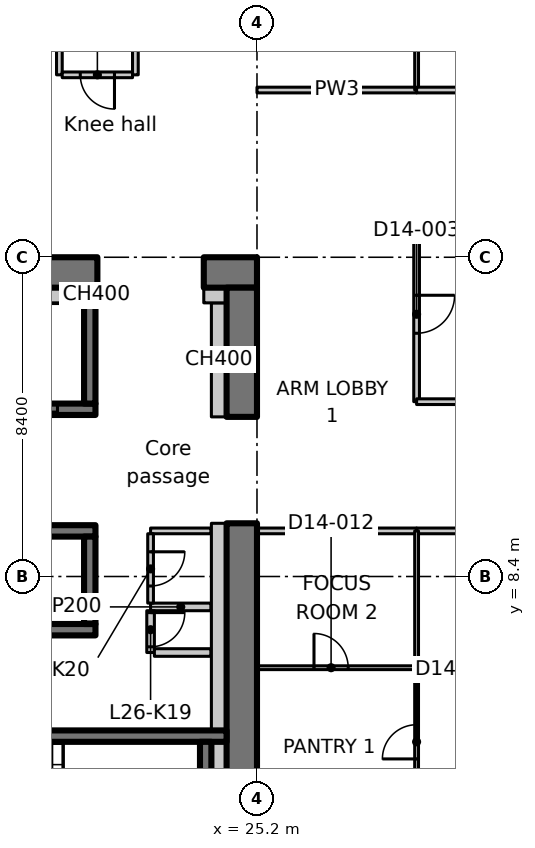
"""IFC4 building model, lengths in metres.
Left out: names, types, materials, properties, quantities, classifications, styles, units other than length and angle.
Written with IfcOpenShell. Run it as: python <this file> out.ifc"""

import sys

from ifc_helpers import new_model, si_unit, direction, frame, frame_2d, origin, place, context, subcontext, project, spatial, polyline, rectangle, outline, extrude, element, fill, save


model = new_model("IFC4")
c1 = context("Model", 3, precision=1e-05, world=origin(), true_north=direction((0.0, 1.0)))
c2 = subcontext(c1, "Body", "Model", "MODEL_VIEW")
j1 = project(units=[si_unit("LENGTHUNIT", "METRE"), si_unit("PLANEANGLEUNIT", "RADIAN")], contexts=[c1])
p1 = place(None, origin())
s1 = spatial("IfcSite", under=j1, at=p1, CompositionType="ELEMENT")
p2 = place(p1, origin())
s2 = spatial("IfcBuilding", under=s1, at=p2, CompositionType="ELEMENT")
p3 = place(p2, frame((0.0, 0.0, 109.7)))
s3 = spatial("IfcBuildingStorey", under=s2, at=p3, CompositionType="ELEMENT", Elevation=109.7)
p4 = place(p3, frame((-1.1, 16.4, 0.0), z_axis=(0.0, 0.0, 1.0), x_axis=(1.0, 0.0, 0.0)))
e1 = element("IfcWall", 1, at=p4, inside=s3, PredefinedType="SHEAR", context=c2, shape_type="SweptSolid", body=[
    extrude(rectangle(XDim=22.1, YDim=0.8, at=frame_2d((11.05, 0.0))), origin(), (0.0, 0.0, 1.0), 3.35),
])
p5 = place(p4, frame((3.15, 0.0, 0.0)))
e2 = element("IfcOpeningElement", 2, at=p5, cuts=e1, PredefinedType="OPENING", context=c2, shape_type="SweptSolid", body=[
    extrude(rectangle(XDim=1.1, YDim=2.3, at=frame_2d((0.55, 1.15))), frame((0.0, 0.41, 0.0), z_axis=(0.0, -1.0, 0.0), x_axis=(1.0, 0.0, 0.0)), (0.0, 0.0, 1.0), 0.82),
])
p6 = place(p3, frame((23.8, 16.4, 0.0), z_axis=(0.0, 0.0, 1.0), x_axis=(1.0, 0.0, 0.0)))
e3 = element("IfcWall", 3, at=p6, inside=s3, PredefinedType="SHEAR", context=c2, shape_type="SweptSolid", body=[
    extrude(rectangle(XDim=1.4, YDim=0.8, at=frame_2d((0.7, 0.0))), origin(), (0.0, 0.0, 1.0), 3.35),
])
p7 = place(p3, frame((24.8, 0.8, 0.0), z_axis=(0.0, 0.0, 1.0), x_axis=(0.0, 1.0, 0.0)))
e4 = element("IfcWall", 4, at=p7, inside=s3, PredefinedType="SHEAR", context=c2, shape_type="SweptSolid", body=[
    extrude(rectangle(XDim=9.0, YDim=0.8, at=frame_2d((4.5, 0.0))), origin(), (0.0, 0.0, 1.0), 3.35),
])
p8 = place(p3, frame((24.8, 12.6, 0.0), z_axis=(0.0, 0.0, 1.0), x_axis=(0.0, 1.0, 0.0)))
e5 = element("IfcWall", 5, at=p8, inside=s3, PredefinedType="SHEAR", context=c2, shape_type="SweptSolid", body=[
    extrude(rectangle(XDim=3.4, YDim=0.8, at=frame_2d((1.7, 0.0))), origin(), (0.0, 0.0, 1.0), 3.35),
])
p9 = place(p3, frame((24.2, 12.6, 0.0), z_axis=(0.0, 0.0, 1.0), x_axis=(0.0, 1.0, 0.0)))
e6 = element("IfcWall", 6, at=p9, inside=s3, PredefinedType="PARTITIONING", context=c2, shape_type="SweptSolid", body=[
    extrude(rectangle(XDim=3.0, YDim=0.4, at=frame_2d((1.5, 0.0))), origin(), (0.0, 0.0, 1.0), 3.35),
])
p10 = place(p3, frame((23.8, 15.8, 0.0), z_axis=(0.0, 0.0, 1.0), x_axis=(1.0, 0.0, 0.0)))
e7 = element("IfcWall", 7, at=p10, inside=s3, PredefinedType="PARTITIONING", context=c2, shape_type="SweptSolid", body=[
    extrude(rectangle(XDim=0.6, YDim=0.4, at=frame_2d((0.3, 0.0))), origin(), (0.0, 0.0, 1.0), 3.35),
])
p11 = place(p3, frame((0.8, 7.0, 0.0), z_axis=(0.0, 0.0, 1.0), x_axis=(1.0, 0.0, 0.0)))
e8 = element("IfcWall", 8, at=p11, inside=s3, PredefinedType="SHEAR", context=c2, shape_type="SweptSolid", body=[
    extrude(rectangle(XDim=20.15, YDim=0.3, at=frame_2d((10.075, 0.0))), origin(), (0.0, 0.0, 1.0), 3.35),
])
p12 = place(p3, frame((0.8, 9.6, 0.0), z_axis=(0.0, 0.0, 1.0), x_axis=(1.0, 0.0, 0.0)))
e9 = element("IfcWall", 9, at=p12, inside=s3, PredefinedType="SHEAR", context=c2, shape_type="SweptSolid", body=[
    extrude(rectangle(XDim=20.15, YDim=0.3, at=frame_2d((10.075, 0.0))), origin(), (0.0, 0.0, 1.0), 3.35),
])
p13 = place(p12, frame((1.25, 0.0, 0.0)))
e10 = element("IfcOpeningElement", 10, at=p13, cuts=e9, PredefinedType="OPENING", context=c2, shape_type="SweptSolid", body=[
    extrude(rectangle(XDim=1.1, YDim=2.3, at=frame_2d((0.55, 1.15))), frame((0.0, 0.16, 0.0), z_axis=(0.0, -1.0, 0.0), x_axis=(1.0, 0.0, 0.0)), (0.0, 0.0, 1.0), 0.32),
])
p14 = place(p12, frame((4.05, 0.0, 0.0)))
e11 = element("IfcOpeningElement", 11, at=p14, cuts=e9, PredefinedType="OPENING", context=c2, shape_type="SweptSolid", body=[
    extrude(rectangle(XDim=1.1, YDim=2.3, at=frame_2d((0.55, 1.15))), frame((0.0, 0.16, 0.0), z_axis=(0.0, -1.0, 0.0), x_axis=(1.0, 0.0, 0.0)), (0.0, 0.0, 1.0), 0.32),
])
p15 = place(p12, frame((6.85, 0.0, 0.0)))
e12 = element("IfcOpeningElement", 12, at=p15, cuts=e9, PredefinedType="OPENING", context=c2, shape_type="SweptSolid", body=[
    extrude(rectangle(XDim=1.1, YDim=2.3, at=frame_2d((0.55, 1.15))), frame((0.0, 0.16, 0.0), z_axis=(0.0, -1.0, 0.0), x_axis=(1.0, 0.0, 0.0)), (0.0, 0.0, 1.0), 0.32),
])
p16 = place(p12, frame((9.65, 0.0, 0.0)))
e13 = element("IfcOpeningElement", 13, at=p16, cuts=e9, PredefinedType="OPENING", context=c2, shape_type="SweptSolid", body=[
    extrude(rectangle(XDim=1.1, YDim=2.3, at=frame_2d((0.55, 1.15))), frame((0.0, 0.16, 0.0), z_axis=(0.0, -1.0, 0.0), x_axis=(1.0, 0.0, 0.0)), (0.0, 0.0, 1.0), 0.32),
])
p17 = place(p12, frame((12.45, 0.0, 0.0)))
e14 = element("IfcOpeningElement", 14, at=p17, cuts=e9, PredefinedType="OPENING", context=c2, shape_type="SweptSolid", body=[
    extrude(rectangle(XDim=1.1, YDim=2.3, at=frame_2d((0.55, 1.15))), frame((0.0, 0.16, 0.0), z_axis=(0.0, -1.0, 0.0), x_axis=(1.0, 0.0, 0.0)), (0.0, 0.0, 1.0), 0.32),
])
p18 = place(p12, frame((15.25, 0.0, 0.0)))
e15 = element("IfcOpeningElement", 15, at=p18, cuts=e9, PredefinedType="OPENING", context=c2, shape_type="SweptSolid", body=[
    extrude(rectangle(XDim=1.1, YDim=2.3, at=frame_2d((0.55, 1.15))), frame((0.0, 0.16, 0.0), z_axis=(0.0, -1.0, 0.0), x_axis=(1.0, 0.0, 0.0)), (0.0, 0.0, 1.0), 0.32),
])
p19 = place(p3, frame((20.8, 7.15, 0.0), z_axis=(0.0, 0.0, 1.0), x_axis=(0.0, 1.0, 0.0)))
e16 = element("IfcWall", 16, at=p19, inside=s3, PredefinedType="SHEAR", context=c2, shape_type="SweptSolid", body=[
    extrude(rectangle(XDim=2.3, YDim=0.3, at=frame_2d((1.15, 0.0))), origin(), (0.0, 0.0, 1.0), 3.35),
])
p20 = place(p3, frame((15.05, 12.8, 0.0), z_axis=(0.0, 0.0, 1.0), x_axis=(1.0, 0.0, 0.0)))
e17 = element("IfcWall", 17, at=p20, inside=s3, PredefinedType="SHEAR", context=c2, shape_type="SweptSolid", body=[
    extrude(rectangle(XDim=5.9, YDim=0.3, at=frame_2d((2.95, 0.0))), origin(), (0.0, 0.0, 1.0), 3.35),
])
p21 = place(p20, frame((3.8, 0.0, 0.0)))
e18 = element("IfcOpeningElement", 18, at=p21, cuts=e17, PredefinedType="OPENING", context=c2, shape_type="SweptSolid", body=[
    extrude(rectangle(XDim=1.1, YDim=2.3, at=frame_2d((0.55, 1.15))), frame((0.0, 0.16, 0.0), z_axis=(0.0, -1.0, 0.0), x_axis=(1.0, 0.0, 0.0)), (0.0, 0.0, 1.0), 0.32),
])
p22 = place(p3, frame((20.8, 12.95, 0.0), z_axis=(0.0, 0.0, 1.0), x_axis=(0.0, 1.0, 0.0)))
e19 = element("IfcWall", 19, at=p22, inside=s3, PredefinedType="SHEAR", context=c2, shape_type="SweptSolid", body=[
    extrude(rectangle(XDim=3.05, YDim=0.3, at=frame_2d((1.525, 0.0))), origin(), (0.0, 0.0, 1.0), 3.35),
])
p23 = place(p3, frame((15.8, 4.2, 0.0), z_axis=(0.0, 0.0, 1.0), x_axis=(1.0, 0.0, 0.0)))
e20 = element("IfcWall", 20, at=p23, inside=s3, PredefinedType="SHEAR", context=c2, shape_type="SweptSolid", body=[
    extrude(rectangle(XDim=8.6, YDim=0.3, at=frame_2d((4.3, 0.0))), origin(), (0.0, 0.0, 1.0), 3.35),
])
p24 = place(p23, frame((0.4, 0.0, 0.0)))
e21 = element("IfcOpeningElement", 21, at=p24, cuts=e20, PredefinedType="OPENING", context=c2, shape_type="SweptSolid", body=[
    extrude(rectangle(XDim=1.0, YDim=2.1, at=frame_2d((0.5, 1.05))), frame((0.0, 0.16, 0.0), z_axis=(0.0, -1.0, 0.0), x_axis=(1.0, 0.0, 0.0)), (0.0, 0.0, 1.0), 0.32),
])
p25 = place(p3, frame((23.85, 1.5, 0.0), z_axis=(0.0, 0.0, 1.0), x_axis=(0.0, 1.0, 0.0)))
e22 = element("IfcWall", 22, at=p25, inside=s3, PredefinedType="SHEAR", context=c2, shape_type="SweptSolid", body=[
    extrude(rectangle(XDim=2.55, YDim=0.3, at=frame_2d((1.275, 0.0))), origin(), (0.0, 0.0, 1.0), 3.35),
])
p26 = place(p3, frame((23.988, 7.6, 0.0), z_axis=(0.0, 0.0, 1.0), x_axis=(-1.0, 0.0, 0.0)))
e23 = element("IfcWall", 23, at=p26, inside=s3, PredefinedType="PARTITIONING", context=c2, shape_type="SweptSolid", body=[
    extrude(rectangle(XDim=1.588, YDim=0.2, at=frame_2d((0.794, 0.0))), origin(), (0.0, 0.0, 1.0), 3.35),
])
p27 = place(p3, frame((22.4, 7.5, 0.0), z_axis=(0.0, 0.0, 1.0), x_axis=(0.0, -1.0, 0.0)))
e24 = element("IfcWall", 24, at=p27, inside=s3, PredefinedType="PARTITIONING", context=c2, shape_type="SweptSolid", body=[
    extrude(rectangle(XDim=1.1, YDim=0.2, at=frame_2d((0.55, 0.0))), origin(), (0.0, 0.0, 1.0), 3.35),
])
p28 = place(p27, frame((0.05, 0.0, 0.0)))
e25 = element("IfcOpeningElement", 25, at=p28, cuts=e24, PredefinedType="OPENING", context=c2, shape_type="SweptSolid", body=[
    extrude(rectangle(XDim=0.9, YDim=2.1, at=frame_2d((0.45, 1.05))), frame((0.0, 0.11, 0.0), z_axis=(0.0, -1.0, 0.0), x_axis=(1.0, 0.0, 0.0)), (0.0, 0.0, 1.0), 0.22),
])
p29 = place(p3, frame((22.5, 6.4, 0.0), z_axis=(0.0, 0.0, 1.0), x_axis=(1.0, 0.0, 0.0)))
e26 = element("IfcWall", 26, at=p29, inside=s3, PredefinedType="PARTITIONING", context=c2, shape_type="SweptSolid", body=[
    extrude(rectangle(XDim=1.488, YDim=0.2, at=frame_2d((0.744, 0.0))), origin(), (0.0, 0.0, 1.0), 3.35),
])
p30 = place(p3, frame((23.988, 9.6, 0.0), z_axis=(0.0, 0.0, 1.0), x_axis=(-1.0, 0.0, 0.0)))
e27 = element("IfcWall", 27, at=p30, inside=s3, PredefinedType="PARTITIONING", context=c2, shape_type="SweptSolid", body=[
    extrude(rectangle(XDim=1.588, YDim=0.15, at=frame_2d((0.794, 0.0))), origin(), (0.0, 0.0, 1.0), 3.35),
])
p31 = place(p3, frame((22.4, 9.525, 0.0), z_axis=(0.0, 0.0, 1.0), x_axis=(0.0, -1.0, 0.0)))
e28 = element("IfcWall", 28, at=p31, inside=s3, PredefinedType="PARTITIONING", context=c2, shape_type="SweptSolid", body=[
    extrude(rectangle(XDim=1.825, YDim=0.15, at=frame_2d((0.913, 0.0))), origin(), (0.0, 0.0, 1.0), 3.35),
])
p32 = place(p31, frame((0.475, 0.0, 0.0)))
e29 = element("IfcOpeningElement", 29, at=p32, cuts=e28, PredefinedType="OPENING", context=c2, shape_type="SweptSolid", body=[
    extrude(rectangle(XDim=0.9, YDim=2.1, at=frame_2d((0.45, 1.05))), frame((0.0, 0.085, 0.0), z_axis=(0.0, -1.0, 0.0), x_axis=(1.0, 0.0, 0.0)), (0.0, 0.0, 1.0), 0.17),
])
p33 = place(p3, frame((20.0, 21.6, 0.0), z_axis=(0.0, 0.0, 1.0), x_axis=(0.0, 1.0, 0.0)))
e30 = element("IfcWall", 30, at=p33, inside=s3, PredefinedType="PARTITIONING", context=c2, shape_type="SweptSolid", body=[
    extrude(rectangle(XDim=2.4, YDim=0.15, at=frame_2d((1.2, 0.0))), origin(), (0.0, 0.0, 1.0), 3.35),
])
p34 = place(p3, frame((22.0, 23.925, 0.0), z_axis=(0.0, 0.0, 1.0), x_axis=(0.0, -1.0, 0.0)))
e31 = element("IfcWall", 31, at=p34, inside=s3, PredefinedType="PARTITIONING", context=c2, shape_type="SweptSolid", body=[
    extrude(rectangle(XDim=2.325, YDim=0.15, at=frame_2d((1.163, 0.0))), origin(), (0.0, 0.0, 1.0), 3.35),
])
p35 = place(p3, frame((21.925, 21.6, 0.0), z_axis=(0.0, 0.0, 1.0), x_axis=(-1.0, 0.0, 0.0)))
e32 = element("IfcWall", 32, at=p35, inside=s3, PredefinedType="PARTITIONING", context=c2, shape_type="SweptSolid", body=[
    extrude(rectangle(XDim=1.85, YDim=0.15, at=frame_2d((0.925, 0.0))), origin(), (0.0, 0.0, 1.0), 3.35),
])
p36 = place(p35, frame((0.475, 0.0, 0.0)))
e33 = element("IfcOpeningElement", 33, at=p36, cuts=e32, PredefinedType="OPENING", context=c2, shape_type="SweptSolid", body=[
    extrude(rectangle(XDim=0.9, YDim=2.1, at=frame_2d((0.45, 1.05))), frame((0.0, 0.085, 0.0), z_axis=(0.0, -1.0, 0.0), x_axis=(1.0, 0.0, 0.0)), (0.0, 0.0, 1.0), 0.17),
])
p37 = place(p3, frame((18.15, 15.8, 0.0), z_axis=(0.0, 0.0, 1.0), x_axis=(1.0, 0.0, 0.0)))
e34 = element("IfcWall", 34, at=p37, inside=s3, PredefinedType="PARTITIONING", context=c2, shape_type="SweptSolid", body=[
    extrude(rectangle(XDim=2.5, YDim=0.4, at=frame_2d((1.25, 0.0))), origin(), (0.0, 0.0, 1.0), 3.35),
])
p38 = place(p3, frame((20.95, 15.8, 0.0), z_axis=(0.0, 0.0, 1.0), x_axis=(1.0, 0.0, 0.0)))
e35 = element("IfcWall", 35, at=p38, inside=s3, PredefinedType="PARTITIONING", context=c2, shape_type="SweptSolid", body=[
    extrude(rectangle(XDim=0.05, YDim=0.4, at=frame_2d((0.025, 0.0))), origin(), (0.0, 0.0, 1.0), 3.35),
])
p39 = place(p3, frame((24.2, 1.5, 0.0), z_axis=(0.0, 0.0, 1.0), x_axis=(0.0, 1.0, 0.0)))
e36 = element("IfcWall", 36, at=p39, inside=s3, PredefinedType="PARTITIONING", context=c2, shape_type="SweptSolid", body=[
    extrude(rectangle(XDim=2.55, YDim=0.4, at=frame_2d((1.275, 0.0))), origin(), (0.0, 0.0, 1.0), 3.35),
])
p40 = place(p3, frame((24.2, 4.35, 0.0), z_axis=(0.0, 0.0, 1.0), x_axis=(0.0, 1.0, 0.0)))
e37 = element("IfcWall", 37, at=p40, inside=s3, PredefinedType="PARTITIONING", context=c2, shape_type="SweptSolid", body=[
    extrude(rectangle(XDim=5.45, YDim=0.4, at=frame_2d((2.725, 0.0))), origin(), (0.0, 0.0, 1.0), 3.35),
])
p41 = place(p3, frame((25.2, 21.2, 0.0), z_axis=(0.0, 0.0, 1.0), x_axis=(1.0, 0.0, 0.0)))
e38 = element("IfcWall", 38, at=p41, inside=s3, PredefinedType="PARTITIONING", context=c2, shape_type="SweptSolid", body=[
    extrude(rectangle(XDim=4.2, YDim=0.15, at=frame_2d((2.1, 0.0))), origin(), (0.0, 0.0, 1.0), 3.33),
])
p42 = place(p3, frame((29.4, 17.6, 0.0), z_axis=(0.0, 0.0, 1.0), x_axis=(0.0, -1.0, 0.0)))
e39 = element("IfcWall", 39, at=p42, inside=s3, PredefinedType="PARTITIONING", context=c2, shape_type="SweptSolid", body=[
    extrude(rectangle(XDim=4.6, YDim=0.15, at=frame_2d((2.3, 0.0))), origin(), (0.0, 0.0, 1.0), 3.33),
])
p43 = place(p42, frame((1.8, 0.0, 0.0)))
e40 = element("IfcOpeningElement", 40, at=p43, cuts=e39, PredefinedType="OPENING", context=c2, shape_type="SweptSolid", body=[
    extrude(rectangle(XDim=1.0, YDim=2.1, at=frame_2d((0.5, 1.05))), frame((0.0, 0.085, 0.0), z_axis=(0.0, -1.0, 0.0), x_axis=(1.0, 0.0, 0.0)), (0.0, 0.0, 1.0), 0.17),
])
p44 = place(p3, frame((29.4, 9.6, 0.0), z_axis=(0.0, 0.0, 1.0), x_axis=(-1.0, 0.0, 0.0)))
e41 = element("IfcWall", 41, at=p44, inside=s3, PredefinedType="PARTITIONING", context=c2, shape_type="SweptSolid", body=[
    extrude(rectangle(XDim=4.2, YDim=0.15, at=frame_2d((2.1, 0.0))), origin(), (0.0, 0.0, 1.0), 3.33),
])
p45 = place(p3, frame((29.4, 27.429, 0.0), z_axis=(0.0, 0.0, 1.0), x_axis=(0.0, -1.0, 0.0)))
e42 = element("IfcWall", 42, at=p45, inside=s3, PredefinedType="PARTITIONING", context=c2, shape_type="SweptSolid", body=[
    extrude(outline(polyline([(0.0, 0.0), (6.229, 0.0), (6.229, 3.33), (2.679, 3.33), (2.677, 2.98), (1.781, 2.98), (1.779, 3.33), (0.154, 3.33), (0.0, 3.33), (0.0, 0.0)])), frame((0.0, 0.05, 0.0), z_axis=(0.0, -1.0, 0.0), x_axis=(1.0, 0.0, 0.0)), (0.0, 0.0, 1.0), 0.1),
])
p46 = place(p3, frame((29.4, 13.0, 0.0), z_axis=(0.0, 0.0, 1.0), x_axis=(1.0, 0.0, 0.0)))
e43 = element("IfcWall", 43, at=p46, inside=s3, PredefinedType="PARTITIONING", context=c2, shape_type="SweptSolid", body=[
    extrude(rectangle(XDim=4.2, YDim=0.15, at=frame_2d((2.1, 0.0))), origin(), (0.0, 0.0, 1.0), 3.33),
])
p47 = place(p3, frame((37.8, 9.6, 0.0), z_axis=(0.0, 0.0, 1.0), x_axis=(-1.0, 0.0, 0.0)))
e44 = element("IfcWall", 44, at=p47, inside=s3, PredefinedType="PARTITIONING", context=c2, shape_type="SweptSolid", body=[
    extrude(rectangle(XDim=8.4, YDim=0.15, at=frame_2d((4.2, 0.0))), origin(), (0.0, 0.0, 1.0), 3.33),
])
p48 = place(p47, frame((1.8, 0.0, 0.0)))
e45 = element("IfcOpeningElement", 45, at=p48, cuts=e44, PredefinedType="OPENING", context=c2, shape_type="SweptSolid", body=[
    extrude(rectangle(XDim=1.6, YDim=2.1, at=frame_2d((0.8, 1.05))), frame((0.0, 0.085, 0.0), z_axis=(0.0, -1.0, 0.0), x_axis=(1.0, 0.0, 0.0)), (0.0, 0.0, 1.0), 0.17),
])
p49 = place(p3, frame((33.6, 17.6, 0.0), z_axis=(0.0, 0.0, 1.0), x_axis=(-1.0, 0.0, 0.0)))
e46 = element("IfcWall", 46, at=p49, inside=s3, PredefinedType="PARTITIONING", context=c2, shape_type="SweptSolid", body=[
    extrude(rectangle(XDim=4.2, YDim=0.15, at=frame_2d((2.1, 0.0))), origin(), (0.0, 0.0, 1.0), 3.33),
])
p50 = place(p3, frame((29.4, 21.2, 0.0), z_axis=(0.0, 0.0, 1.0), x_axis=(1.0, 0.0, 0.0)))
e47 = element("IfcWall", 47, at=p50, inside=s3, PredefinedType="PARTITIONING", context=c2, shape_type="SweptSolid", body=[
    extrude(rectangle(XDim=8.4, YDim=0.15, at=frame_2d((4.2, 0.0))), origin(), (0.0, 0.0, 1.0), 3.33),
])
p51 = place(p50, frame((3.3, 0.0, 0.0)))
e48 = element("IfcOpeningElement", 48, at=p51, cuts=e47, PredefinedType="OPENING", context=c2, shape_type="SweptSolid", body=[
    extrude(rectangle(XDim=1.6, YDim=2.1, at=frame_2d((0.8, 1.05))), frame((0.0, 0.085, 0.0), z_axis=(0.0, -1.0, 0.0), x_axis=(1.0, 0.0, 0.0)), (0.0, 0.0, 1.0), 0.17),
])
p52 = place(p3, frame((29.4, 1.8, 0.0), z_axis=(0.0, 0.0, 1.0), x_axis=(0.0, 1.0, 0.0)))
e49 = element("IfcWall", 49, at=p52, inside=s3, PredefinedType="PARTITIONING", context=c2, shape_type="SweptSolid", body=[
    extrude(rectangle(XDim=4.2, YDim=0.1, at=frame_2d((2.1, 0.0))), origin(), (0.0, 0.0, 1.0), 3.33),
])
p53 = place(p52, frame((1.8, 0.0, 0.0)))
e50 = element("IfcOpeningElement", 50, at=p53, cuts=e49, PredefinedType="OPENING", context=c2, shape_type="SweptSolid", body=[
    extrude(rectangle(XDim=0.9, YDim=2.1, at=frame_2d((0.45, 1.05))), frame((0.0, 0.06, 0.0), z_axis=(0.0, -1.0, 0.0), x_axis=(1.0, 0.0, 0.0)), (0.0, 0.0, 1.0), 0.12),
])
p54 = place(p3, frame((29.4, 6.0, 0.0), z_axis=(0.0, 0.0, 1.0), x_axis=(0.0, 1.0, 0.0)))
e51 = element("IfcWall", 51, at=p54, inside=s3, PredefinedType="PARTITIONING", context=c2, shape_type="SweptSolid", body=[
    extrude(rectangle(XDim=3.6, YDim=0.1, at=frame_2d((1.8, 0.0))), origin(), (0.0, 0.0, 1.0), 3.33),
])
p55 = place(p3, frame((25.2, 6.0, 0.0), z_axis=(0.0, 0.0, 1.0), x_axis=(1.0, 0.0, 0.0)))
e52 = element("IfcWall", 52, at=p55, inside=s3, PredefinedType="PARTITIONING", context=c2, shape_type="SweptSolid", body=[
    extrude(rectangle(XDim=4.2, YDim=0.1, at=frame_2d((2.1, 0.0))), origin(), (0.0, 0.0, 1.0), 3.33),
])
p56 = place(p55, frame((1.5, 0.0, 0.0)))
e53 = element("IfcOpeningElement", 53, at=p56, cuts=e52, PredefinedType="OPENING", context=c2, shape_type="SweptSolid", body=[
    extrude(rectangle(XDim=0.9, YDim=2.1, at=frame_2d((0.45, 1.05))), frame((0.0, 0.06, 0.0), z_axis=(0.0, -1.0, 0.0), x_axis=(1.0, 0.0, 0.0)), (0.0, 0.0, 1.0), 0.12),
])
p57 = place(p21, origin())
e54 = element("IfcDoor", 54, at=p57, inside=s3, OperationType="SLIDING_TO_LEFT", PredefinedType="DOOR", context=c2, shape_type="SweptSolid", body=[
    extrude(rectangle(XDim=1.1, YDim=2.3, at=frame_2d((0.55, 1.15))), frame((0.0, 0.025, 0.0), z_axis=(0.0, -1.0, 0.0), x_axis=(1.0, 0.0, 0.0)), (0.0, 0.0, 1.0), 0.05),
])
fill(e18, e54)
p58 = place(p28, origin())
e55 = element("IfcDoor", 55, at=p58, inside=s3, OperationType="SINGLE_SWING_LEFT", PredefinedType="DOOR", context=c2, shape_type="SweptSolid", body=[
    extrude(rectangle(XDim=0.9, YDim=2.1, at=frame_2d((0.45, 1.05))), frame((0.0, 0.025, 0.0), z_axis=(0.0, -1.0, 0.0), x_axis=(1.0, 0.0, 0.0)), (0.0, 0.0, 1.0), 0.05),
])
fill(e25, e55)
p59 = place(p32, origin())
e56 = element("IfcDoor", 56, at=p59, inside=s3, OperationType="SINGLE_SWING_RIGHT", PredefinedType="DOOR", context=c2, shape_type="SweptSolid", body=[
    extrude(rectangle(XDim=0.9, YDim=2.1, at=frame_2d((0.45, 1.05))), frame((0.0, 0.025, 0.0), z_axis=(0.0, -1.0, 0.0), x_axis=(1.0, 0.0, 0.0)), (0.0, 0.0, 1.0), 0.05),
])
fill(e29, e56)
p60 = place(p36, origin())
e57 = element("IfcDoor", 57, at=p60, inside=s3, OperationType="SINGLE_SWING_RIGHT", PredefinedType="DOOR", context=c2, shape_type="SweptSolid", body=[
    extrude(rectangle(XDim=0.9, YDim=2.1, at=frame_2d((0.45, 1.05))), frame((0.0, 0.025, 0.0), z_axis=(0.0, -1.0, 0.0), x_axis=(1.0, 0.0, 0.0)), (0.0, 0.0, 1.0), 0.05),
])
fill(e33, e57)
p61 = place(p43, origin())
e58 = element("IfcDoor", 58, at=p61, inside=s3, OperationType="SINGLE_SWING_LEFT", PredefinedType="DOOR", context=c2, shape_type="SweptSolid", body=[
    extrude(rectangle(XDim=1.0, YDim=2.1, at=frame_2d((0.5, 1.05))), frame((0.0, 0.025, 0.0), z_axis=(0.0, -1.0, 0.0), x_axis=(1.0, 0.0, 0.0)), (0.0, 0.0, 1.0), 0.05),
])
fill(e40, e58)
p62 = place(p53, origin())
e59 = element("IfcDoor", 59, at=p62, inside=s3, OperationType="SINGLE_SWING_LEFT", PredefinedType="DOOR", context=c2, shape_type="SweptSolid", body=[
    extrude(rectangle(XDim=0.9, YDim=2.1, at=frame_2d((0.45, 1.05))), frame((0.0, 0.025, 0.0), z_axis=(0.0, -1.0, 0.0), x_axis=(1.0, 0.0, 0.0)), (0.0, 0.0, 1.0), 0.05),
])
fill(e50, e59)
p63 = place(p56, origin())
e60 = element("IfcDoor", 60, at=p63, inside=s3, OperationType="SINGLE_SWING_LEFT", PredefinedType="DOOR", context=c2, shape_type="SweptSolid", body=[
    extrude(rectangle(XDim=0.9, YDim=2.1, at=frame_2d((0.45, 1.05))), frame((0.0, 0.025, 0.0), z_axis=(0.0, -1.0, 0.0), x_axis=(1.0, 0.0, 0.0)), (0.0, 0.0, 1.0), 0.05),
])
fill(e53, e60)
save(model, sys.argv[1])
